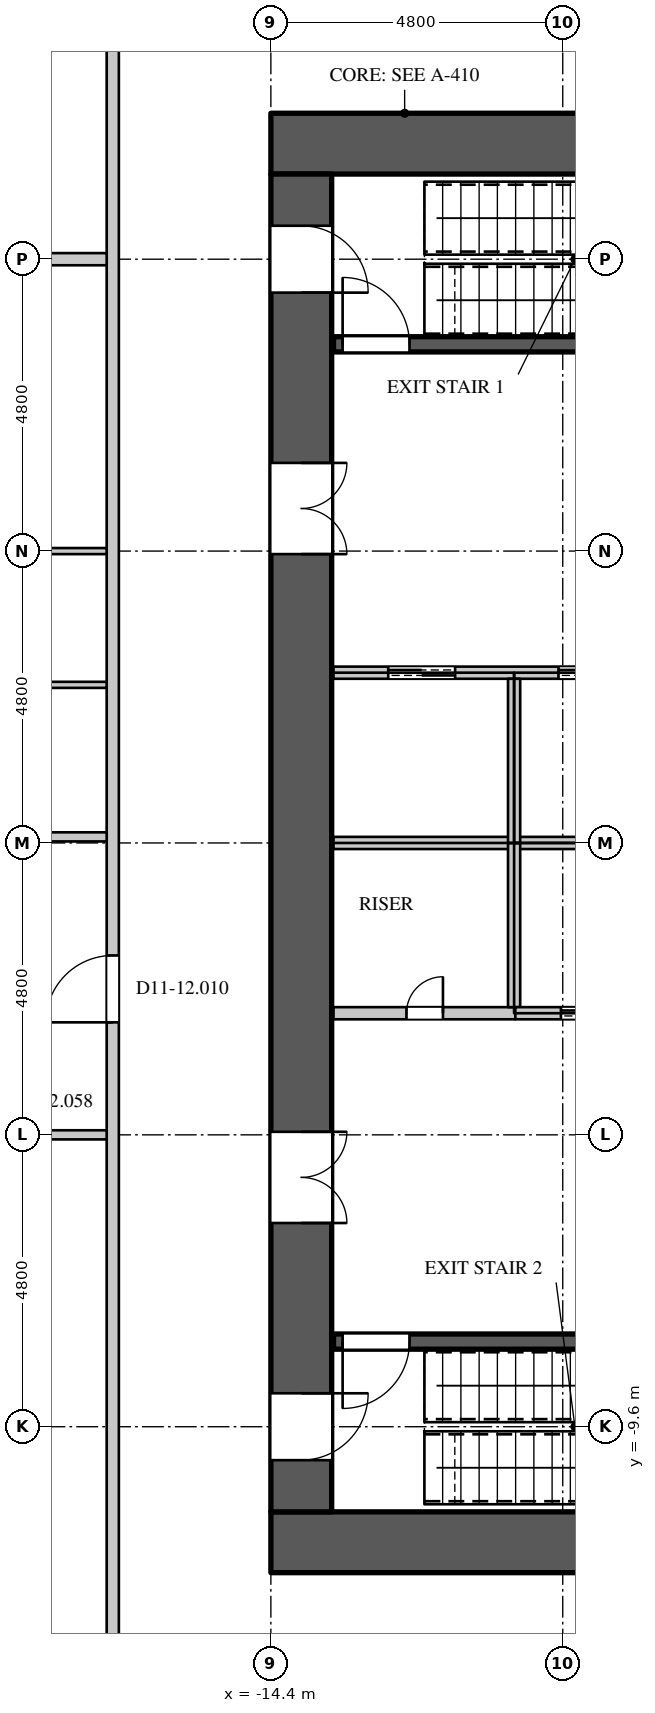
"""IFC4 building model, lengths in metres.
Left out: names, types, materials, properties, quantities, classifications, styles, units other than length and angle.
Written with IfcOpenShell. Run it as: python <this file> out.ifc"""

import sys

from ifc_helpers import new_model, si_unit, direction, frame, frame_2d, origin, place, context, subcontext, project, spatial, rectangle, extrude, element, fill, save


model = new_model("IFC4")
c1 = context("Model", 3, precision=1e-05, world=origin(), true_north=direction((0.0, 1.0)))
c2 = subcontext(c1, "Body", "Model", "MODEL_VIEW")
j1 = project(units=[si_unit("LENGTHUNIT", "METRE"), si_unit("PLANEANGLEUNIT", "RADIAN")], contexts=[c1])
p1 = place(None, origin())
s1 = spatial("IfcSite", under=j1, at=p1, CompositionType="ELEMENT")
p2 = place(p1, origin())
s2 = spatial("IfcBuilding", under=s1, at=p2, CompositionType="ELEMENT")
p3 = place(p2, frame((0.0, 0.0, 50.7)))
s3 = spatial("IfcBuildingStorey", under=s2, at=p3, CompositionType="ELEMENT", Elevation=50.7)
for number, where, z_axis, x_axis in (
    (1, (-14.4, 11.5, 0.0), (0.0, 0.0, 1.0), (1.0, 0.0, 0.0)),
    (2, (-14.4, -11.5, 0.0), (0.0, 0.0, 1.0), (1.0, 0.0, 0.0)),
):
    element("IfcWall", number, at=place(p3, frame(where, z_axis=z_axis, x_axis=x_axis)), inside=s3, PredefinedType="SHEAR", context=c2, shape_type="SweptSolid", body=[
        extrude(rectangle(XDim=28.8, YDim=1.0, at=frame_2d((14.4, 0.0))), origin(), (0.0, 0.0, 1.0), 4.2),
    ])
p4 = place(p3, frame((-13.9, -11.0, 0.0), z_axis=(0.0, 0.0, 1.0), x_axis=(0.0, 1.0, 0.0)))
e3 = element("IfcWall", 3, at=p4, inside=s3, PredefinedType="SHEAR", context=c2, shape_type="SweptSolid", body=[
    extrude(rectangle(XDim=22.0, YDim=1.0, at=frame_2d((11.0, 0.0))), origin(), (0.0, 0.0, 1.0), 4.2),
])
p5 = place(p4, frame((20.05, 0.0, 0.0)))
e4 = element("IfcOpeningElement", 4, at=p5, cuts=e3, PredefinedType="OPENING", context=c2, shape_type="SweptSolid", body=[
    extrude(rectangle(XDim=1.1, YDim=2.2, at=frame_2d((0.55, 1.1))), frame((0.0, 0.51, 0.0), z_axis=(0.0, -1.0, 0.0), x_axis=(1.0, 0.0, 0.0)), (0.0, 0.0, 1.0), 1.02),
])
p6 = place(p4, frame((0.85, 0.0, 0.0)))
e5 = element("IfcOpeningElement", 5, at=p6, cuts=e3, PredefinedType="OPENING", context=c2, shape_type="SweptSolid", body=[
    extrude(rectangle(XDim=1.1, YDim=2.2, at=frame_2d((0.55, 1.1))), frame((0.0, 0.51, 0.0), z_axis=(0.0, -1.0, 0.0), x_axis=(1.0, 0.0, 0.0)), (0.0, 0.0, 1.0), 1.02),
])
p7 = place(p4, frame((15.75, 0.0, 0.0)))
e6 = element("IfcOpeningElement", 6, at=p7, cuts=e3, PredefinedType="OPENING", context=c2, shape_type="SweptSolid", body=[
    extrude(rectangle(XDim=1.5, YDim=2.4, at=frame_2d((0.75, 1.2))), frame((0.0, 0.51, 0.0), z_axis=(0.0, -1.0, 0.0), x_axis=(1.0, 0.0, 0.0)), (0.0, 0.0, 1.0), 1.02),
])
p8 = place(p4, frame((4.75, 0.0, 0.0)))
e7 = element("IfcOpeningElement", 7, at=p8, cuts=e3, PredefinedType="OPENING", context=c2, shape_type="SweptSolid", body=[
    extrude(rectangle(XDim=1.5, YDim=2.4, at=frame_2d((0.75, 1.2))), frame((0.0, 0.51, 0.0), z_axis=(0.0, -1.0, 0.0), x_axis=(1.0, 0.0, 0.0)), (0.0, 0.0, 1.0), 1.02),
])
p9 = place(p3, frame((-17.0, -14.5, 0.0), z_axis=(0.0, 0.0, 1.0), x_axis=(0.0, 1.0, 0.0)))
e8 = element("IfcWall", 8, at=p9, inside=s3, PredefinedType="PARTITIONING", context=c2, shape_type="SweptSolid", body=[
    extrude(rectangle(XDim=29.0, YDim=0.2, at=frame_2d((14.5, 0.0))), origin(), (0.0, 0.0, 1.0), 3.95),
])
p10 = place(p9, frame((11.55, 0.0, 0.0)))
e9 = element("IfcOpeningElement", 9, at=p10, cuts=e8, PredefinedType="OPENING", context=c2, shape_type="SweptSolid", body=[
    extrude(rectangle(XDim=1.1, YDim=2.4, at=frame_2d((0.55, 1.2))), frame((0.0, 0.11, 0.0), z_axis=(0.0, -1.0, 0.0), x_axis=(1.0, 0.0, 0.0)), (0.0, 0.0, 1.0), 0.22),
])
p11 = place(p3, frame((-22.747, 11.968, 0.0), z_axis=(0.0, 0.0, 1.0), x_axis=(0.707106781187, 0.707106781187, 0.0)))
e10 = element("IfcWall", 10, at=p11, inside=s3, PredefinedType="PARTITIONING", context=c2, shape_type="SweptSolid", body=[
    extrude(rectangle(XDim=9.913, YDim=0.15, at=frame_2d((4.957, 0.0))), origin(), (0.0, 0.0, 1.0), 3.95),
])
p12 = place(p11, frame((4.45, 0.0, 0.0)))
e11 = element("IfcOpeningElement", 11, at=p12, cuts=e10, PredefinedType="OPENING", context=c2, shape_type="SweptSolid", body=[
    extrude(rectangle(XDim=0.95, YDim=2.2, at=frame_2d((0.475, 1.1))), frame((0.0, 0.085, 0.0), z_axis=(0.0, -1.0, 0.0), x_axis=(1.0, 0.0, 0.0)), (0.0, 0.0, 1.0), 0.17),
])
p13 = place(p11, frame((8.35, 0.0, 0.0)))
e12 = element("IfcOpeningElement", 12, at=p13, cuts=e10, PredefinedType="OPENING", context=c2, shape_type="SweptSolid", body=[
    extrude(rectangle(XDim=0.95, YDim=2.2, at=frame_2d((0.475, 1.1))), frame((0.0, 0.085, 0.0), z_axis=(0.0, -1.0, 0.0), x_axis=(1.0, 0.0, 0.0)), (0.0, 0.0, 1.0), 0.17),
])
p14 = place(p3, frame((-21.725, 0.1, 0.0), z_axis=(0.0, 0.0, 1.0), x_axis=(1.0, 0.0, 0.0)))
e13 = element("IfcWall", 13, at=p14, inside=s3, PredefinedType="PARTITIONING", context=c2, shape_type="SweptSolid", body=[
    extrude(rectangle(XDim=4.625, YDim=0.15, at=frame_2d((2.312, 0.0))), origin(), (0.0, 0.0, 1.0), 3.95),
])
p15 = place(p14, frame((1.85, 0.0, 0.0)))
e14 = element("IfcOpeningElement", 14, at=p15, cuts=e13, PredefinedType="OPENING", context=c2, shape_type="SweptSolid", body=[
    extrude(rectangle(XDim=0.95, YDim=2.2, at=frame_2d((0.475, 1.1))), frame((0.0, 0.085, 0.0), z_axis=(0.0, -1.0, 0.0), x_axis=(1.0, 0.0, 0.0)), (0.0, 0.0, 1.0), 0.17),
])
p16 = place(p3, frame((-19.78, -4.8, 0.0), z_axis=(0.0, 0.0, 1.0), x_axis=(1.0, 0.0, 0.0)))
e15 = element("IfcWall", 15, at=p16, inside=s3, PredefinedType="PARTITIONING", context=c2, shape_type="SweptSolid", body=[
    extrude(rectangle(XDim=2.68, YDim=0.15, at=frame_2d((1.34, 0.0))), origin(), (0.0, 0.0, 1.0), 3.25),
])
p17 = place(p16, frame((0.3, 0.0, 0.0)))
e16 = element("IfcOpeningElement", 16, at=p17, cuts=e15, PredefinedType="OPENING", context=c2, shape_type="SweptSolid", body=[
    extrude(rectangle(XDim=0.95, YDim=2.2, at=frame_2d((0.475, 1.1))), frame((0.0, 0.085, 0.0), z_axis=(0.0, -1.0, 0.0), x_axis=(1.0, 0.0, 0.0)), (0.0, 0.0, 1.0), 0.17),
])
p18 = place(p3, frame((-28.855, 9.6, 0.0), z_axis=(0.0, 0.0, 1.0), x_axis=(1.0, 0.0, 0.0)))
e17 = element("IfcWall", 17, at=p18, inside=s3, PredefinedType="PARTITIONING", context=c2, shape_type="SweptSolid", body=[
    extrude(rectangle(XDim=11.755, YDim=0.2, at=frame_2d((5.877, 0.0))), origin(), (0.0, 0.0, 1.0), 3.95),
])
p19 = place(p3, frame((-13.37, -2.8, 0.0), z_axis=(0.0, 0.0, 1.0), x_axis=(1.0, 0.0, 0.0)))
e18 = element("IfcWall", 18, at=p19, inside=s3, PredefinedType="PARTITIONING", context=c2, shape_type="SweptSolid", body=[
    extrude(rectangle(XDim=2.99, YDim=0.2, at=frame_2d((1.495, 0.0))), origin(), (0.0, 0.0, 1.0), 3.95),
])
p20 = place(p19, frame((1.2, 0.0, 0.0)))
e19 = element("IfcOpeningElement", 19, at=p20, cuts=e18, PredefinedType="OPENING", context=c2, shape_type="SweptSolid", body=[
    extrude(rectangle(XDim=0.6, YDim=2.0, at=frame_2d((0.3, 1.0))), frame((0.0, 0.11, 0.0), z_axis=(0.0, -1.0, 0.0), x_axis=(1.0, 0.0, 0.0)), (0.0, 0.0, 1.0), 0.22),
])
p21 = place(p3, frame((-13.37, 0.0, 0.0), z_axis=(0.0, 0.0, 1.0), x_axis=(1.0, 0.0, 0.0)))
e20 = element("IfcWall", 20, at=p21, inside=s3, PredefinedType="PARTITIONING", context=c2, shape_type="SweptSolid", body=[
    extrude(rectangle(XDim=23.77, YDim=0.2, at=frame_2d((11.885, 0.0))), origin(), (0.0, 0.0, 1.0), 3.95),
])
p22 = place(p3, frame((-13.37, 2.8, 0.0), z_axis=(0.0, 0.0, 1.0), x_axis=(1.0, 0.0, 0.0)))
e21 = element("IfcWall", 21, at=p22, inside=s3, PredefinedType="PARTITIONING", context=c2, shape_type="SweptSolid", body=[
    extrude(rectangle(XDim=23.77, YDim=0.2, at=frame_2d((11.885, 0.0))), origin(), (0.0, 0.0, 1.0), 3.95),
])
p23 = place(p22, frame((0.9, 0.0, 0.0)))
e22 = element("IfcOpeningElement", 22, at=p23, cuts=e21, PredefinedType="OPENING", context=c2, shape_type="SweptSolid", body=[
    extrude(rectangle(XDim=1.1, YDim=2.2, at=frame_2d((0.55, 1.1))), frame((0.0, 0.11, 0.0), z_axis=(0.0, -1.0, 0.0), x_axis=(1.0, 0.0, 0.0)), (0.0, 0.0, 1.0), 0.22),
])
p24 = place(p22, frame((3.7, 0.0, 0.0)))
e23 = element("IfcOpeningElement", 23, at=p24, cuts=e21, PredefinedType="OPENING", context=c2, shape_type="SweptSolid", body=[
    extrude(rectangle(XDim=1.1, YDim=2.2, at=frame_2d((0.55, 1.1))), frame((0.0, 0.11, 0.0), z_axis=(0.0, -1.0, 0.0), x_axis=(1.0, 0.0, 0.0)), (0.0, 0.0, 1.0), 0.22),
])
p25 = place(p22, frame((6.3, 0.0, 0.0)))
e24 = element("IfcOpeningElement", 24, at=p25, cuts=e21, PredefinedType="OPENING", context=c2, shape_type="SweptSolid", body=[
    extrude(rectangle(XDim=1.1, YDim=2.2, at=frame_2d((0.55, 1.1))), frame((0.0, 0.11, 0.0), z_axis=(0.0, -1.0, 0.0), x_axis=(1.0, 0.0, 0.0)), (0.0, 0.0, 1.0), 0.22),
])
p26 = place(p22, frame((8.9, 0.0, 0.0)))
e25 = element("IfcOpeningElement", 25, at=p26, cuts=e21, PredefinedType="OPENING", context=c2, shape_type="SweptSolid", body=[
    extrude(rectangle(XDim=1.1, YDim=2.2, at=frame_2d((0.55, 1.1))), frame((0.0, 0.11, 0.0), z_axis=(0.0, -1.0, 0.0), x_axis=(1.0, 0.0, 0.0)), (0.0, 0.0, 1.0), 0.22),
])
p27 = place(p22, frame((11.5, 0.0, 0.0)))
e26 = element("IfcOpeningElement", 26, at=p27, cuts=e21, PredefinedType="OPENING", context=c2, shape_type="SweptSolid", body=[
    extrude(rectangle(XDim=1.1, YDim=2.2, at=frame_2d((0.55, 1.1))), frame((0.0, 0.11, 0.0), z_axis=(0.0, -1.0, 0.0), x_axis=(1.0, 0.0, 0.0)), (0.0, 0.0, 1.0), 0.22),
])
p28 = place(p22, frame((14.1, 0.0, 0.0)))
e27 = element("IfcOpeningElement", 27, at=p28, cuts=e21, PredefinedType="OPENING", context=c2, shape_type="SweptSolid", body=[
    extrude(rectangle(XDim=1.1, YDim=2.2, at=frame_2d((0.55, 1.1))), frame((0.0, 0.11, 0.0), z_axis=(0.0, -1.0, 0.0), x_axis=(1.0, 0.0, 0.0)), (0.0, 0.0, 1.0), 0.22),
])
p29 = place(p22, frame((16.7, 0.0, 0.0)))
e28 = element("IfcOpeningElement", 28, at=p29, cuts=e21, PredefinedType="OPENING", context=c2, shape_type="SweptSolid", body=[
    extrude(rectangle(XDim=1.1, YDim=2.2, at=frame_2d((0.55, 1.1))), frame((0.0, 0.11, 0.0), z_axis=(0.0, -1.0, 0.0), x_axis=(1.0, 0.0, 0.0)), (0.0, 0.0, 1.0), 0.22),
])
p30 = place(p22, frame((19.3, 0.0, 0.0)))
e29 = element("IfcOpeningElement", 29, at=p30, cuts=e21, PredefinedType="OPENING", context=c2, shape_type="SweptSolid", body=[
    extrude(rectangle(XDim=1.1, YDim=2.2, at=frame_2d((0.55, 1.1))), frame((0.0, 0.11, 0.0), z_axis=(0.0, -1.0, 0.0), x_axis=(1.0, 0.0, 0.0)), (0.0, 0.0, 1.0), 0.22),
])
p31 = place(p3, frame((-10.4, -2.7, 0.0), z_axis=(0.0, 0.0, 1.0), x_axis=(0.0, 1.0, 0.0)))
e30 = element("IfcWall", 30, at=p31, inside=s3, PredefinedType="PARTITIONING", context=c2, shape_type="SweptSolid", body=[
    extrude(rectangle(XDim=2.7, YDim=0.2, at=frame_2d((1.35, 0.0))), origin(), (0.0, 0.0, 1.0), 3.95),
])
p32 = place(p3, frame((-10.38, -2.8, 0.0), z_axis=(0.0, 0.0, 1.0), x_axis=(1.0, 0.0, 0.0)))
e31 = element("IfcWall", 31, at=p32, inside=s3, PredefinedType="PARTITIONING", context=c2, shape_type="SweptSolid", body=[
    extrude(rectangle(XDim=2.56, YDim=0.2, at=frame_2d((1.28, 0.0))), origin(), (0.0, 0.0, 1.0), 3.95),
])
p33 = place(p32, frame((0.75, 0.0, 0.0)))
e32 = element("IfcOpeningElement", 32, at=p33, cuts=e31, PredefinedType="OPENING", context=c2, shape_type="SweptSolid", body=[
    extrude(rectangle(XDim=1.1, YDim=2.2, at=frame_2d((0.55, 1.1))), frame((0.0, 0.11, 0.0), z_axis=(0.0, -1.0, 0.0), x_axis=(1.0, 0.0, 0.0)), (0.0, 0.0, 1.0), 0.22),
])
p34 = place(p3, frame((-10.4, 0.0, 0.0), z_axis=(0.0, 0.0, 1.0), x_axis=(0.0, 1.0, 0.0)))
e33 = element("IfcWall", 33, at=p34, inside=s3, PredefinedType="PARTITIONING", context=c2, shape_type="SweptSolid", body=[
    extrude(rectangle(XDim=2.7, YDim=0.2, at=frame_2d((1.35, 0.0))), origin(), (0.0, 0.0, 1.0), 3.95),
])
p35 = place(p3, frame((-13.37, -8.2, 0.0), z_axis=(0.0, 0.0, 1.0), x_axis=(1.0, 0.0, 0.0)))
e34 = element("IfcWall", 34, at=p35, inside=s3, PredefinedType="SHEAR", context=c2, shape_type="SweptSolid", body=[
    extrude(rectangle(XDim=8.095, YDim=0.25, at=frame_2d((4.048, 0.0))), origin(), (0.0, 0.0, 1.0), 3.95),
])
p36 = place(p35, frame((0.15, 0.0, 0.0)))
e35 = element("IfcOpeningElement", 35, at=p36, cuts=e34, PredefinedType="OPENING", context=c2, shape_type="SweptSolid", body=[
    extrude(rectangle(XDim=1.1, YDim=2.2, at=frame_2d((0.55, 1.1))), frame((0.0, 0.135, 0.0), z_axis=(0.0, -1.0, 0.0), x_axis=(1.0, 0.0, 0.0)), (0.0, 0.0, 1.0), 0.27),
])
p37 = place(p3, frame((-13.37, 8.2, 0.0), z_axis=(0.0, 0.0, 1.0), x_axis=(1.0, 0.0, 0.0)))
e36 = element("IfcWall", 36, at=p37, inside=s3, PredefinedType="SHEAR", context=c2, shape_type="SweptSolid", body=[
    extrude(rectangle(XDim=8.095, YDim=0.25, at=frame_2d((4.048, 0.0))), origin(), (0.0, 0.0, 1.0), 3.95),
])
p38 = place(p37, frame((0.15, 0.0, 0.0)))
e37 = element("IfcOpeningElement", 37, at=p38, cuts=e36, PredefinedType="OPENING", context=c2, shape_type="SweptSolid", body=[
    extrude(rectangle(XDim=1.1, YDim=2.2, at=frame_2d((0.55, 1.1))), frame((0.0, 0.135, 0.0), z_axis=(0.0, -1.0, 0.0), x_axis=(1.0, 0.0, 0.0)), (0.0, 0.0, 1.0), 0.27),
])
p39 = place(p3, frame((-21.78, 4.8, 0.0), z_axis=(0.0, 0.0, 1.0), x_axis=(1.0, 0.0, 0.0)))
e38 = element("IfcWall", 38, at=p39, inside=s3, PredefinedType="PARTITIONING", context=c2, shape_type="SweptSolid", body=[
    extrude(rectangle(XDim=4.68, YDim=0.1, at=frame_2d((2.34, 0.0))), origin(), (0.0, 0.0, 1.0), 3.25),
])
p40 = place(p39, frame((1.95, 0.0, 0.0)))
e39 = element("IfcOpeningElement", 39, at=p40, cuts=e38, PredefinedType="OPENING", context=c2, shape_type="SweptSolid", body=[
    extrude(rectangle(XDim=0.9, YDim=2.2, at=frame_2d((0.45, 1.1))), frame((0.0, 0.06, 0.0), z_axis=(0.0, -1.0, 0.0), x_axis=(1.0, 0.0, 0.0)), (0.0, 0.0, 1.0), 0.12),
])
p41 = place(p3, frame((-21.725, 2.6, 0.0), z_axis=(0.0, 0.0, 1.0), x_axis=(1.0, 0.0, 0.0)))
e40 = element("IfcWall", 40, at=p41, inside=s3, PredefinedType="PARTITIONING", context=c2, shape_type="SweptSolid", body=[
    extrude(rectangle(XDim=4.625, YDim=0.1, at=frame_2d((2.312, 0.0))), origin(), (0.0, 0.0, 1.0), 3.95),
])
p42 = place(p20, origin())
e41 = element("IfcDoor", 41, at=p42, inside=s3, OperationType="SINGLE_SWING_RIGHT", PredefinedType="DOOR", context=c2, shape_type="SweptSolid", body=[
    extrude(rectangle(XDim=0.6, YDim=2.0, at=frame_2d((0.3, 1.0))), frame((0.0, 0.025, 0.0), z_axis=(0.0, -1.0, 0.0), x_axis=(1.0, 0.0, 0.0)), (0.0, 0.0, 1.0), 0.05),
])
fill(e19, e41)
p43 = place(p23, origin())
e42 = element("IfcDoor", 42, at=p43, inside=s3, OperationType="DOUBLE_DOOR_SLIDING", PredefinedType="DOOR", context=c2, shape_type="SweptSolid", body=[
    extrude(rectangle(XDim=1.1, YDim=2.2, at=frame_2d((0.55, 1.1))), frame((0.0, 0.025, 0.0), z_axis=(0.0, -1.0, 0.0), x_axis=(1.0, 0.0, 0.0)), (0.0, 0.0, 1.0), 0.05),
])
fill(e22, e42)
p44 = place(p24, origin())
e43 = element("IfcDoor", 43, at=p44, inside=s3, OperationType="DOUBLE_DOOR_SLIDING", PredefinedType="DOOR", context=c2, shape_type="SweptSolid", body=[
    extrude(rectangle(XDim=1.1, YDim=2.2, at=frame_2d((0.55, 1.1))), frame((0.0, 0.025, 0.0), z_axis=(0.0, -1.0, 0.0), x_axis=(1.0, 0.0, 0.0)), (0.0, 0.0, 1.0), 0.05),
])
fill(e23, e43)
p45 = place(p33, origin())
e44 = element("IfcDoor", 44, at=p45, inside=s3, OperationType="DOUBLE_DOOR_SLIDING", PredefinedType="DOOR", context=c2, shape_type="SweptSolid", body=[
    extrude(rectangle(XDim=1.1, YDim=2.2, at=frame_2d((0.55, 1.1))), frame((0.0, 0.025, 0.0), z_axis=(0.0, -1.0, 0.0), x_axis=(1.0, 0.0, 0.0)), (0.0, 0.0, 1.0), 0.05),
])
fill(e32, e44)
p46 = place(p38, origin())
e45 = element("IfcDoor", 45, at=p46, inside=s3, OperationType="SINGLE_SWING_LEFT", PredefinedType="DOOR", context=c2, shape_type="SweptSolid", body=[
    extrude(rectangle(XDim=1.1, YDim=2.2, at=frame_2d((0.55, 1.1))), frame((0.0, 0.025, 0.0), z_axis=(0.0, -1.0, 0.0), x_axis=(1.0, 0.0, 0.0)), (0.0, 0.0, 1.0), 0.05),
])
fill(e37, e45)
p47 = place(p36, origin())
e46 = element("IfcDoor", 46, at=p47, inside=s3, OperationType="SINGLE_SWING_RIGHT", PredefinedType="DOOR", context=c2, shape_type="SweptSolid", body=[
    extrude(rectangle(XDim=1.1, YDim=2.2, at=frame_2d((0.55, 1.1))), frame((0.0, 0.025, 0.0), z_axis=(0.0, -1.0, 0.0), x_axis=(1.0, 0.0, 0.0)), (0.0, 0.0, 1.0), 0.05),
])
fill(e35, e46)
p48 = place(p5, origin())
e47 = element("IfcDoor", 47, at=p48, inside=s3, OperationType="SINGLE_SWING_RIGHT", PredefinedType="DOOR", context=c2, shape_type="SweptSolid", body=[
    extrude(rectangle(XDim=1.1, YDim=2.2, at=frame_2d((0.55, 1.1))), frame((0.0, -0.445, 0.0), z_axis=(0.0, -1.0, 0.0), x_axis=(1.0, 0.0, 0.0)), (0.0, 0.0, 1.0), 0.05),
])
fill(e4, e47)
p49 = place(p6, origin())
e48 = element("IfcDoor", 48, at=p49, inside=s3, OperationType="SINGLE_SWING_LEFT", PredefinedType="DOOR", context=c2, shape_type="SweptSolid", body=[
    extrude(rectangle(XDim=1.1, YDim=2.2, at=frame_2d((0.55, 1.1))), frame((0.0, -0.445, 0.0), z_axis=(0.0, -1.0, 0.0), x_axis=(1.0, 0.0, 0.0)), (0.0, 0.0, 1.0), 0.05),
])
fill(e5, e48)
p50 = place(p7, origin())
e49 = element("IfcDoor", 49, at=p50, inside=s3, OperationType="DOUBLE_DOOR_SINGLE_SWING", PredefinedType="DOOR", context=c2, shape_type="SweptSolid", body=[
    extrude(rectangle(XDim=1.5, YDim=2.4, at=frame_2d((0.75, 1.2))), frame((0.0, -0.445, 0.0), z_axis=(0.0, -1.0, 0.0), x_axis=(1.0, 0.0, 0.0)), (0.0, 0.0, 1.0), 0.05),
])
fill(e6, e49)
p51 = place(p8, origin())
e50 = element("IfcDoor", 50, at=p51, inside=s3, OperationType="DOUBLE_DOOR_SINGLE_SWING", PredefinedType="DOOR", context=c2, shape_type="SweptSolid", body=[
    extrude(rectangle(XDim=1.5, YDim=2.4, at=frame_2d((0.75, 1.2))), frame((0.0, -0.445, 0.0), z_axis=(0.0, -1.0, 0.0), x_axis=(1.0, 0.0, 0.0)), (0.0, 0.0, 1.0), 0.05),
])
fill(e7, e50)
p52 = place(p10, origin())
e51 = element("IfcDoor", 51, at=p52, inside=s3, OperationType="SINGLE_SWING_LEFT", PredefinedType="DOOR", context=c2, shape_type="SweptSolid", body=[
    extrude(rectangle(XDim=1.1, YDim=2.4, at=frame_2d((0.55, 1.2))), frame((0.0, 0.025, 0.0), z_axis=(0.0, -1.0, 0.0), x_axis=(1.0, 0.0, 0.0)), (0.0, 0.0, 1.0), 0.05),
])
fill(e9, e51)
save(model, sys.argv[1])
